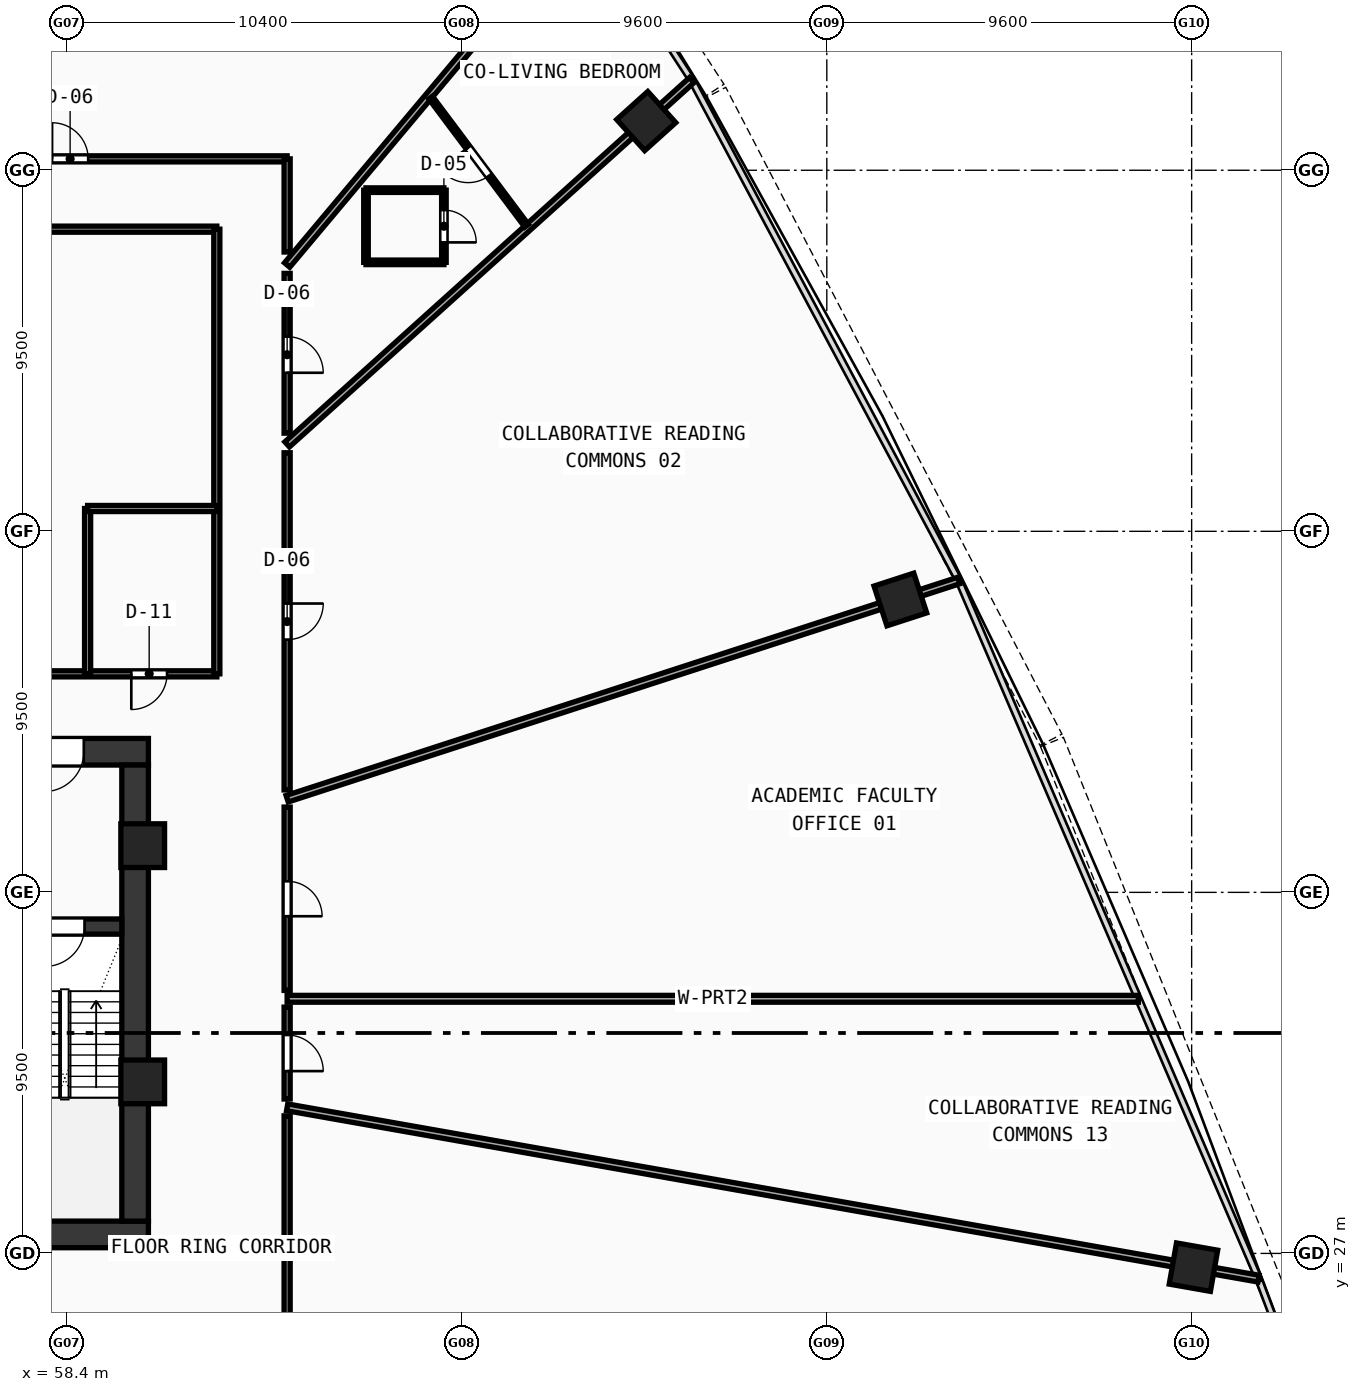
"""IFC4 building model, lengths in metres.
Left out: names, types, materials, properties, quantities, classifications, styles, units other than length and angle.
Written with IfcOpenShell. Run it as: python <this file> out.ifc"""

import sys

from ifc_helpers import new_model, si_unit, direction, frame, frame_2d, origin, origin_with_axes, origin_2d, place, context, subcontext, project, spatial, rectangle, hollow_rectangle, extrude, source, transform, mapped, element, fill, save


model = new_model("IFC4")
c1 = context("Model", 3, precision=1e-05, world=origin(), true_north=direction((0.0, 1.0)))
c2 = subcontext(c1, "Body", "Model", "MODEL_VIEW")
j1 = project(units=[si_unit("LENGTHUNIT", "METRE"), si_unit("PLANEANGLEUNIT", "RADIAN")], contexts=[c1])
p1 = place(None, origin())
s1 = spatial("IfcSite", under=j1, at=p1, CompositionType="ELEMENT")
p2 = place(p1, origin())
s2 = spatial("IfcBuilding", under=s1, at=p2, CompositionType="ELEMENT")
p3 = place(p2, frame((0.0, 0.0, 48.55)))
s3 = spatial("IfcBuildingStorey", under=s2, at=p3, CompositionType="ELEMENT", Elevation=48.55)
p4 = place(p3, frame((35.45, 27.5, 0.0), z_axis=(0.0, 0.0, 1.0), x_axis=(1.0, 0.0, 0.0)))
e1 = element("IfcWall", 1, at=p4, inside=s3, PredefinedType="SHEAR", context=c2, shape_type="SweptSolid", body=[
    extrude(rectangle(XDim=25.1, YDim=0.7, at=frame_2d((12.55, 0.0))), origin(), (0.0, 0.0, 1.0), 3.37),
])
p5 = place(p3, frame((49.2, 40.2, 0.0), z_axis=(0.0, 0.0, 1.0), x_axis=(1.0, 0.0, 0.0)))
e2 = element("IfcWall", 2, at=p5, inside=s3, PredefinedType="SHEAR", context=c2, shape_type="SweptSolid", body=[
    extrude(rectangle(XDim=11.35, YDim=0.7, at=frame_2d((5.675, 0.0))), origin(), (0.0, 0.0, 1.0), 3.37),
])
p6 = place(p5, frame((8.6, 0.0, 0.0)))
e3 = element("IfcOpeningElement", 3, at=p6, cuts=e2, PredefinedType="OPENING", context=c2, shape_type="SweptSolid", body=[
    extrude(rectangle(XDim=1.05, YDim=2.1, at=frame_2d((0.525, 1.05))), frame((0.0, 0.36, 0.0), z_axis=(0.0, -1.0, 0.0), x_axis=(1.0, 0.0, 0.0)), (0.0, 0.0, 1.0), 0.72),
])
p7 = place(p3, frame((60.2, 27.85, 0.0), z_axis=(0.0, 0.0, 1.0), x_axis=(0.0, 1.0, 0.0)))
e4 = element("IfcWall", 4, at=p7, inside=s3, PredefinedType="SHEAR", context=c2, shape_type="SweptSolid", body=[
    extrude(rectangle(XDim=12.0, YDim=0.7, at=frame_2d((6.0, 0.0))), origin(), (0.0, 0.0, 1.0), 3.37),
])
p8 = place(p3, frame((56.8, 35.6, 0.0), z_axis=(0.0, 0.0, 1.0), x_axis=(1.0, 0.0, 0.0)))
e5 = element("IfcWall", 5, at=p8, inside=s3, PredefinedType="SHEAR", context=c2, shape_type="SweptSolid", body=[
    extrude(rectangle(XDim=3.05, YDim=0.4, at=frame_2d((1.525, 0.0))), origin(), (0.0, 0.0, 1.0), 3.37),
])
p9 = place(p8, frame((1.02, 0.0, 0.0)))
e6 = element("IfcOpeningElement", 6, at=p9, cuts=e5, PredefinedType="OPENING", context=c2, shape_type="SweptSolid", body=[
    extrude(rectangle(XDim=1.05, YDim=2.1, at=frame_2d((0.525, 1.05))), frame((0.0, 0.21, 0.0), z_axis=(0.0, -1.0, 0.0), x_axis=(1.0, 0.0, 0.0)), (0.0, 0.0, 1.0), 0.42),
])
m1 = source(origin(), c2, "Body", "SweptSolid", [
    extrude(hollow_rectangle(XDim=1.15, YDim=1.15, WallThickness=0.048, at=origin_2d()), origin(), (0.0, 0.0, 1.0), 3.63),
])
for number, where, z_axis, x_axis in (
    (7, (60.4, 31.513, -0.26), (0.0, 0.0, 1.0), (1.0, 0.0, 0.0)),
    (8, (60.4, 37.729, -0.26), (0.0, 0.0, 1.0), (1.0, 0.0, 0.0)),
):
    element("IfcColumn", number, at=place(p3, frame(where, z_axis=z_axis, x_axis=x_axis)), inside=s3, PredefinedType="COLUMN", context=c2, shape_type="MappedRepresentation", body=[
        mapped(m1, transform((0.0, 0.0, 0.0), scale=1.0)),
    ])
m2 = source(origin(), c2, "Body", "SweptSolid", [
    extrude(hollow_rectangle(XDim=1.1, YDim=1.1, WallThickness=0.045, at=origin_2d()), origin(), (0.0, 0.0, 1.0), 3.63),
])
for number, where, z_axis, x_axis in (
    (9, (88.048, 26.638, -0.26), (0.0, 0.0, 1.0), (0.174, 0.985, 0.0)),
    (10, (80.335, 44.206, -0.26), (0.0, 0.0, 1.0), (-0.309, 0.951, 0.0)),
    (11, (73.649, 56.794, -0.26), (0.0, 0.0, 1.0), (-0.669, 0.743, 0.0)),
):
    element("IfcColumn", number, at=place(p3, frame(where, z_axis=z_axis, x_axis=x_axis)), inside=s3, PredefinedType="COLUMN", context=c2, shape_type="MappedRepresentation", body=[
        mapped(m2, transform((0.0, 0.0, 0.0), scale=1.0)),
    ])
p10 = place(p3, frame((45.92, 42.25, 0.0), z_axis=(0.0, 0.0, 1.0), x_axis=(1.0, 0.0, 0.0)))
e12 = element("IfcWall", 12, at=p10, inside=s3, PredefinedType="PARTITIONING", context=c2, shape_type="SweptSolid", body=[
    extrude(rectangle(XDim=16.43, YDim=0.16, at=frame_2d((8.215, 0.0))), origin(), (0.0, 0.0, 1.0), 2.67),
])
p11 = place(p10, frame((2.1, 0.0, 0.0)))
e13 = element("IfcOpeningElement", 13, at=p11, cuts=e12, PredefinedType="OPENING", context=c2, shape_type="SweptSolid", body=[
    extrude(rectangle(XDim=0.92, YDim=2.1, at=frame_2d((0.46, 1.05))), frame((0.0, 0.09, 0.0), z_axis=(0.0, -1.0, 0.0), x_axis=(1.0, 0.0, 0.0)), (0.0, 0.0, 1.0), 0.18),
])
p12 = place(p10, frame((14.18, 0.0, 0.0)))
e14 = element("IfcOpeningElement", 14, at=p12, cuts=e12, PredefinedType="OPENING", context=c2, shape_type="SweptSolid", body=[
    extrude(rectangle(XDim=0.94, YDim=2.1, at=frame_2d((0.47, 1.05))), frame((0.0, 0.09, 0.0), z_axis=(0.0, -1.0, 0.0), x_axis=(1.0, 0.0, 0.0)), (0.0, 0.0, 1.0), 0.18),
])
p13 = place(p3, frame((45.92, 53.95, 0.0), z_axis=(0.0, 0.0, 1.0), x_axis=(1.0, 0.0, 0.0)))
e15 = element("IfcWall", 15, at=p13, inside=s3, PredefinedType="PARTITIONING", context=c2, shape_type="SweptSolid", body=[
    extrude(rectangle(XDim=16.43, YDim=0.16, at=frame_2d((8.215, 0.0))), origin(), (0.0, 0.0, 1.0), 2.67),
])
p14 = place(p3, frame((62.35, 42.25, 0.0), z_axis=(0.0, 0.0, 1.0), x_axis=(0.0, 1.0, 0.0)))
e16 = element("IfcWall", 16, at=p14, inside=s3, PredefinedType="PARTITIONING", context=c2, shape_type="SweptSolid", body=[
    extrude(rectangle(XDim=11.7, YDim=0.16, at=frame_2d((5.85, 0.0))), origin(), (0.0, 0.0, 1.0), 2.67),
])
p15 = place(p3, frame((58.95, 42.25, 0.0), z_axis=(0.0, 0.0, 1.0), x_axis=(0.0, 1.0, 0.0)))
e17 = element("IfcWall", 17, at=p15, inside=s3, PredefinedType="PARTITIONING", context=c2, shape_type="SweptSolid", body=[
    extrude(rectangle(XDim=4.35, YDim=0.16, at=frame_2d((2.175, 0.0))), origin(), (0.0, 0.0, 1.0), 2.67),
])
p16 = place(p3, frame((58.95, 46.6, 0.0), z_axis=(0.0, 0.0, 1.0), x_axis=(1.0, 0.0, 0.0)))
e18 = element("IfcWall", 18, at=p16, inside=s3, PredefinedType="PARTITIONING", context=c2, shape_type="SweptSolid", body=[
    extrude(rectangle(XDim=3.4, YDim=0.16, at=frame_2d((1.7, 0.0))), origin(), (0.0, 0.0, 1.0), 2.67),
])
p17 = place(p3, frame((64.2, 33.7, 0.0), z_axis=(0.0, 0.0, 1.0), x_axis=(1.0, 0.0, 0.0)))
e19 = element("IfcWall", 19, at=p17, inside=s3, PredefinedType="PARTITIONING", context=c2, shape_type="SweptSolid", body=[
    extrude(rectangle(XDim=22.398, YDim=0.18, at=frame_2d((11.199, 0.0))), origin(), (0.0, 0.0, 1.0), 2.67),
])
p18 = place(p3, frame((64.2, 38.964, 0.0), z_axis=(0.0, 0.0, 1.0), x_axis=(0.951055212532, 0.309021006915, 0.0)))
e20 = element("IfcWall", 20, at=p18, inside=s3, PredefinedType="PARTITIONING", context=c2, shape_type="SweptSolid", body=[
    extrude(rectangle(XDim=18.581, YDim=0.18, at=frame_2d((9.291, 0.0))), origin(), (0.0, 0.0, 1.0), 2.67),
])
p19 = place(p3, frame((64.2, 48.287, 0.0), z_axis=(0.0, 0.0, 1.0), x_axis=(0.743156867614, 0.669117231969, 0.0)))
e21 = element("IfcWall", 21, at=p19, inside=s3, PredefinedType="PARTITIONING", context=c2, shape_type="SweptSolid", body=[
    extrude(rectangle(XDim=14.327, YDim=0.18, at=frame_2d((7.164, 0.0))), origin(), (0.0, 0.0, 1.0), 2.67),
])
p20 = place(p3, frame((64.2, 53.006, 0.0), z_axis=(0.0, 0.0, 1.0), x_axis=(0.642786334534, 0.766045513098, 0.0)))
e22 = element("IfcWall", 22, at=p20, inside=s3, PredefinedType="PARTITIONING", context=c2, shape_type="SweptSolid", body=[
    extrude(rectangle(XDim=12.11, YDim=0.18, at=frame_2d((6.055, 0.0))), origin(), (0.0, 0.0, 1.0), 2.67),
])
p21 = place(p3, frame((64.2, 30.844, 0.0), z_axis=(0.0, 0.0, 1.0), x_axis=(0.984807792045, -0.173647956302, 0.0)))
e23 = element("IfcWall", 23, at=p21, inside=s3, PredefinedType="PARTITIONING", context=c2, shape_type="SweptSolid", body=[
    extrude(rectangle(XDim=25.954, YDim=0.18, at=frame_2d((12.977, 0.0))), origin(), (0.0, 0.0, 1.0), 2.67),
])
p22 = place(p3, frame((52.391, 55.8, 0.0), z_axis=(0.0, 0.0, 1.0), x_axis=(1.0, 0.0, 0.0)))
e24 = element("IfcWall", 24, at=p22, inside=s3, PredefinedType="PARTITIONING", context=c2, shape_type="SweptSolid", body=[
    extrude(rectangle(XDim=11.809, YDim=0.16, at=frame_2d((5.904, 0.0))), origin(), (0.0, 0.0, 1.0), 2.67),
])
p23 = place(p22, frame((5.624, 0.0, 0.0)))
e25 = element("IfcOpeningElement", 25, at=p23, cuts=e24, PredefinedType="OPENING", context=c2, shape_type="SweptSolid", body=[
    extrude(rectangle(XDim=0.95, YDim=2.1, at=frame_2d((0.475, 1.05))), frame((0.0, 0.09, 0.0), z_axis=(0.0, -1.0, 0.0), x_axis=(1.0, 0.0, 0.0)), (0.0, 0.0, 1.0), 0.18),
])
p24 = place(p3, frame((64.2, 55.8, 0.0), z_axis=(0.0, 0.0, 1.0), x_axis=(0.0, -1.0, 0.0)))
e26 = element("IfcWall", 26, at=p24, inside=s3, PredefinedType="PARTITIONING", context=c2, shape_type="SweptSolid", body=[
    extrude(rectangle(XDim=2.451, YDim=0.16, at=frame_2d((1.226, 0.0))), origin(), (0.0, 0.0, 1.0), 2.97),
])
p25 = place(p3, frame((64.2, 52.787, 0.0), z_axis=(0.0, 0.0, 1.0), x_axis=(0.0, -1.0, 0.0)))
e27 = element("IfcWall", 27, at=p25, inside=s3, PredefinedType="PARTITIONING", context=c2, shape_type="SweptSolid", body=[
    extrude(rectangle(XDim=4.204, YDim=0.16, at=frame_2d((2.102, 0.0))), origin(), (0.0, 0.0, 1.0), 3.37),
])
p26 = place(p25, frame((1.665, 0.0, 0.0)))
e28 = element("IfcOpeningElement", 28, at=p26, cuts=e27, PredefinedType="OPENING", context=c2, shape_type="SweptSolid", body=[
    extrude(rectangle(XDim=0.95, YDim=2.1, at=frame_2d((0.475, 1.05))), frame((0.0, 0.09, 0.0), z_axis=(0.0, -1.0, 0.0), x_axis=(1.0, 0.0, 0.0)), (0.0, 0.0, 1.0), 0.18),
])
p27 = place(p3, frame((64.2, 48.067, 0.0), z_axis=(0.0, 0.0, 1.0), x_axis=(0.0, -1.0, 0.0)))
e29 = element("IfcWall", 29, at=p27, inside=s3, PredefinedType="PARTITIONING", context=c2, shape_type="SweptSolid", body=[
    extrude(rectangle(XDim=8.872, YDim=0.16, at=frame_2d((4.436, 0.0))), origin(), (0.0, 0.0, 1.0), 2.67),
])
p28 = place(p27, frame((3.967, 0.0, 0.0)))
e30 = element("IfcOpeningElement", 30, at=p28, cuts=e29, PredefinedType="OPENING", context=c2, shape_type="SweptSolid", body=[
    extrude(rectangle(XDim=0.95, YDim=2.1, at=frame_2d((0.475, 1.05))), frame((0.0, 0.09, 0.0), z_axis=(0.0, -1.0, 0.0), x_axis=(1.0, 0.0, 0.0)), (0.0, 0.0, 1.0), 0.18),
])
p29 = place(p3, frame((64.2, 38.744, 0.0), z_axis=(0.0, 0.0, 1.0), x_axis=(0.0, -1.0, 0.0)))
e31 = element("IfcWall", 31, at=p29, inside=s3, PredefinedType="PARTITIONING", context=c2, shape_type="SweptSolid", body=[
    extrude(rectangle(XDim=4.824, YDim=0.16, at=frame_2d((2.412, 0.0))), origin(), (0.0, 0.0, 1.0), 3.37),
])
p30 = place(p29, frame((1.952, 0.0, 0.0)))
e32 = element("IfcOpeningElement", 32, at=p30, cuts=e31, PredefinedType="OPENING", context=c2, shape_type="SweptSolid", body=[
    extrude(rectangle(XDim=0.92, YDim=2.1, at=frame_2d((0.46, 1.05))), frame((0.0, 0.09, 0.0), z_axis=(0.0, -1.0, 0.0), x_axis=(1.0, 0.0, 0.0)), (0.0, 0.0, 1.0), 0.18),
])
p31 = place(p3, frame((64.2, 33.48, 0.0), z_axis=(0.0, 0.0, 1.0), x_axis=(0.0, -1.0, 0.0)))
e33 = element("IfcWall", 33, at=p31, inside=s3, PredefinedType="PARTITIONING", context=c2, shape_type="SweptSolid", body=[
    extrude(rectangle(XDim=2.417, YDim=0.16, at=frame_2d((1.208, 0.0))), origin(), (0.0, 0.0, 1.0), 3.37),
])
p32 = place(p31, frame((0.733, 0.0, 0.0)))
e34 = element("IfcOpeningElement", 34, at=p32, cuts=e33, PredefinedType="OPENING", context=c2, shape_type="SweptSolid", body=[
    extrude(rectangle(XDim=0.95, YDim=2.1, at=frame_2d((0.475, 1.05))), frame((0.0, 0.09, 0.0), z_axis=(0.0, -1.0, 0.0), x_axis=(1.0, 0.0, 0.0)), (0.0, 0.0, 1.0), 0.18),
])
p33 = place(p3, frame((64.2, 30.62, 0.0), z_axis=(0.0, 0.0, 1.0), x_axis=(0.0, -1.0, 0.0)))
e35 = element("IfcWall", 35, at=p33, inside=s3, PredefinedType="PARTITIONING", context=c2, shape_type="SweptSolid", body=[
    extrude(rectangle(XDim=5.82, YDim=0.16, at=frame_2d((2.91, 0.0))), origin(), (0.0, 0.0, 1.0), 2.97),
])
p34 = place(p3, frame((66.275, 53.077, 0.0), z_axis=(0.0, 0.0, 1.0), x_axis=(1.0, 0.0, 0.0)))
e36 = element("IfcWall", 36, at=p34, inside=s3, PredefinedType="PARTITIONING", context=c2, shape_type="SweptSolid", body=[
    extrude(rectangle(XDim=2.05, YDim=0.12, at=frame_2d((1.025, 0.0))), origin(), (0.0, 0.0, 1.0), 2.97),
])
p35 = place(p3, frame((68.325, 53.077, 0.0), z_axis=(0.0, 0.0, 1.0), x_axis=(0.0, 1.0, 0.0)))
e37 = element("IfcWall", 37, at=p35, inside=s3, PredefinedType="PARTITIONING", context=c2, shape_type="SweptSolid", body=[
    extrude(rectangle(XDim=1.9, YDim=0.12, at=frame_2d((0.95, 0.0))), origin(), (0.0, 0.0, 1.0), 3.37),
])
p36 = place(p35, frame((0.525, 0.0, 0.0)))
e38 = element("IfcOpeningElement", 38, at=p36, cuts=e37, PredefinedType="OPENING", context=c2, shape_type="SweptSolid", body=[
    extrude(rectangle(XDim=0.85, YDim=2.1, at=frame_2d((0.425, 1.05))), frame((0.0, 0.07, 0.0), z_axis=(0.0, -1.0, 0.0), x_axis=(1.0, 0.0, 0.0)), (0.0, 0.0, 1.0), 0.14),
])
p37 = place(p3, frame((68.325, 54.977, 0.0), z_axis=(0.0, 0.0, 1.0), x_axis=(-1.0, 0.0, 0.0)))
e39 = element("IfcWall", 39, at=p37, inside=s3, PredefinedType="PARTITIONING", context=c2, shape_type="SweptSolid", body=[
    extrude(rectangle(XDim=2.05, YDim=0.12, at=frame_2d((1.025, 0.0))), origin(), (0.0, 0.0, 1.0), 3.37),
])
p38 = place(p3, frame((66.275, 54.977, 0.0), z_axis=(0.0, 0.0, 1.0), x_axis=(0.0, -1.0, 0.0)))
e40 = element("IfcWall", 40, at=p38, inside=s3, PredefinedType="PARTITIONING", context=c2, shape_type="SweptSolid", body=[
    extrude(rectangle(XDim=1.9, YDim=0.12, at=frame_2d((0.95, 0.0))), origin(), (0.0, 0.0, 1.0), 2.97),
])
p39 = place(p3, frame((70.501, 54.04, 0.0), z_axis=(0.0, 0.0, 1.0), x_axis=(-0.599443526822, 0.800417052636, 0.0)))
e41 = element("IfcWall", 41, at=p39, inside=s3, PredefinedType="PARTITIONING", context=c2, shape_type="SweptSolid", body=[
    extrude(rectangle(XDim=4.213, YDim=0.12, at=frame_2d((2.106, 0.0))), origin(), (0.0, 0.0, 1.0), 2.67),
])
p40 = place(p39, frame((1.646, 0.0, 0.0)))
e42 = element("IfcOpeningElement", 42, at=p40, cuts=e41, PredefinedType="OPENING", context=c2, shape_type="SweptSolid", body=[
    extrude(rectangle(XDim=0.92, YDim=2.1, at=frame_2d((0.46, 1.05))), frame((0.0, 0.07, 0.0), z_axis=(0.0, -1.0, 0.0), x_axis=(1.0, 0.0, 0.0)), (0.0, 0.0, 1.0), 0.14),
])
m3 = source(origin(), c2, "Body", "SweptSolid", [
    extrude(rectangle(XDim=1.05, YDim=2.1, at=frame_2d((0.525, 1.05))), frame((0.0, 0.025, 0.0), z_axis=(0.0, -1.0, 0.0), x_axis=(1.0, 0.0, 0.0)), (0.0, 0.0, 1.0), 0.05),
])
p41 = place(p9, frame((1.05, 0.0, 0.0), z_axis=(0.0, 0.0, 1.0), x_axis=(-1.0, 0.0, 0.0)))
e43 = element("IfcDoor", 43, at=p41, inside=s3, OperationType="SINGLE_SWING_RIGHT", PredefinedType="DOOR", context=c2, shape_type="MappedRepresentation", body=[
    mapped(m3, transform((0.0, 0.0, 0.0), scale=1.0)),
])
fill(e6, e43)
p42 = place(p6, frame((1.05, 0.0, 0.0), z_axis=(0.0, 0.0, 1.0), x_axis=(-1.0, 0.0, 0.0)))
e44 = element("IfcDoor", 44, at=p42, inside=s3, OperationType="SINGLE_SWING_RIGHT", PredefinedType="DOOR", context=c2, shape_type="MappedRepresentation", body=[
    mapped(m3, transform((0.0, 0.0, 0.0), scale=1.0)),
])
fill(e3, e44)
m4 = source(origin(), c2, "Body", "SweptSolid", [
    extrude(rectangle(XDim=0.94, YDim=2.1, at=frame_2d((0.47, 1.05))), frame((0.0, 0.025, 0.0), z_axis=(0.0, -1.0, 0.0), x_axis=(1.0, 0.0, 0.0)), (0.0, 0.0, 1.0), 0.05),
])
p43 = place(p12, frame((0.94, 0.0, 0.0), z_axis=(0.0, 0.0, 1.0), x_axis=(-1.0, 0.0, 0.0)))
e45 = element("IfcDoor", 45, at=p43, inside=s3, OperationType="SINGLE_SWING_RIGHT", PredefinedType="DOOR", context=c2, shape_type="MappedRepresentation", body=[
    mapped(m4, transform((0.0, 0.0, 0.0), scale=1.0)),
])
fill(e14, e45)
m5 = source(origin(), c2, "Body", "SweptSolid", [
    extrude(rectangle(XDim=0.92, YDim=2.1, at=frame_2d((0.46, 1.05))), frame((0.0, 0.025, 0.0), z_axis=(0.0, -1.0, 0.0), x_axis=(1.0, 0.0, 0.0)), (0.0, 0.0, 1.0), 0.05),
])
p44 = place(p30, origin_with_axes())
e46 = element("IfcDoor", 46, at=p44, inside=s3, OperationType="SINGLE_SWING_RIGHT", PredefinedType="DOOR", context=c2, shape_type="MappedRepresentation", body=[
    mapped(m5, transform((0.0, 0.0, 0.0), scale=1.0)),
])
fill(e32, e46)
m6 = source(origin(), c2, "Body", "SweptSolid", [
    extrude(rectangle(XDim=0.95, YDim=2.1, at=frame_2d((0.475, 1.05))), frame((0.0, 0.025, 0.0), z_axis=(0.0, -1.0, 0.0), x_axis=(1.0, 0.0, 0.0)), (0.0, 0.0, 1.0), 0.05),
])
p45 = place(p28, origin_with_axes())
e47 = element("IfcDoor", 47, at=p45, inside=s3, OperationType="SINGLE_SWING_LEFT", PredefinedType="DOOR", context=c2, shape_type="MappedRepresentation", body=[
    mapped(m6, transform((0.0, 0.0, 0.0), scale=1.0)),
])
fill(e30, e47)
p46 = place(p26, origin_with_axes())
e48 = element("IfcDoor", 48, at=p46, inside=s3, OperationType="SINGLE_SWING_RIGHT", PredefinedType="DOOR", context=c2, shape_type="MappedRepresentation", body=[
    mapped(m6, transform((0.0, 0.0, 0.0), scale=1.0)),
])
fill(e28, e48)
m7 = source(origin(), c2, "Body", "SweptSolid", [
    extrude(rectangle(XDim=0.85, YDim=2.1, at=frame_2d((0.425, 1.05))), frame((0.0, 0.025, 0.0), z_axis=(0.0, -1.0, 0.0), x_axis=(1.0, 0.0, 0.0)), (0.0, 0.0, 1.0), 0.05),
])
p47 = place(p36, frame((0.85, 0.0, 0.0), z_axis=(0.0, 0.0, 1.0), x_axis=(-1.0, 0.0, 0.0)))
e49 = element("IfcDoor", 49, at=p47, inside=s3, OperationType="SINGLE_SWING_RIGHT", PredefinedType="DOOR", context=c2, shape_type="MappedRepresentation", body=[
    mapped(m7, transform((0.0, 0.0, 0.0), scale=1.0)),
])
fill(e38, e49)
p48 = place(p40, origin_with_axes())
e50 = element("IfcDoor", 50, at=p48, inside=s3, OperationType="SINGLE_SWING_RIGHT", PredefinedType="DOOR", context=c2, shape_type="MappedRepresentation", body=[
    mapped(m5, transform((0.0, 0.0, 0.0), scale=1.0)),
])
fill(e42, e50)
p49 = place(p23, origin_with_axes())
e51 = element("IfcDoor", 51, at=p49, inside=s3, OperationType="SINGLE_SWING_LEFT", PredefinedType="DOOR", context=c2, shape_type="MappedRepresentation", body=[
    mapped(m6, transform((0.0, 0.0, 0.0), scale=1.0)),
])
fill(e25, e51)
p50 = place(p32, origin_with_axes())
e52 = element("IfcDoor", 52, at=p50, inside=s3, OperationType="SINGLE_SWING_RIGHT", PredefinedType="DOOR", context=c2, shape_type="MappedRepresentation", body=[
    mapped(m6, transform((0.0, 0.0, 0.0), scale=1.0)),
])
fill(e34, e52)
save(model, sys.argv[1])
